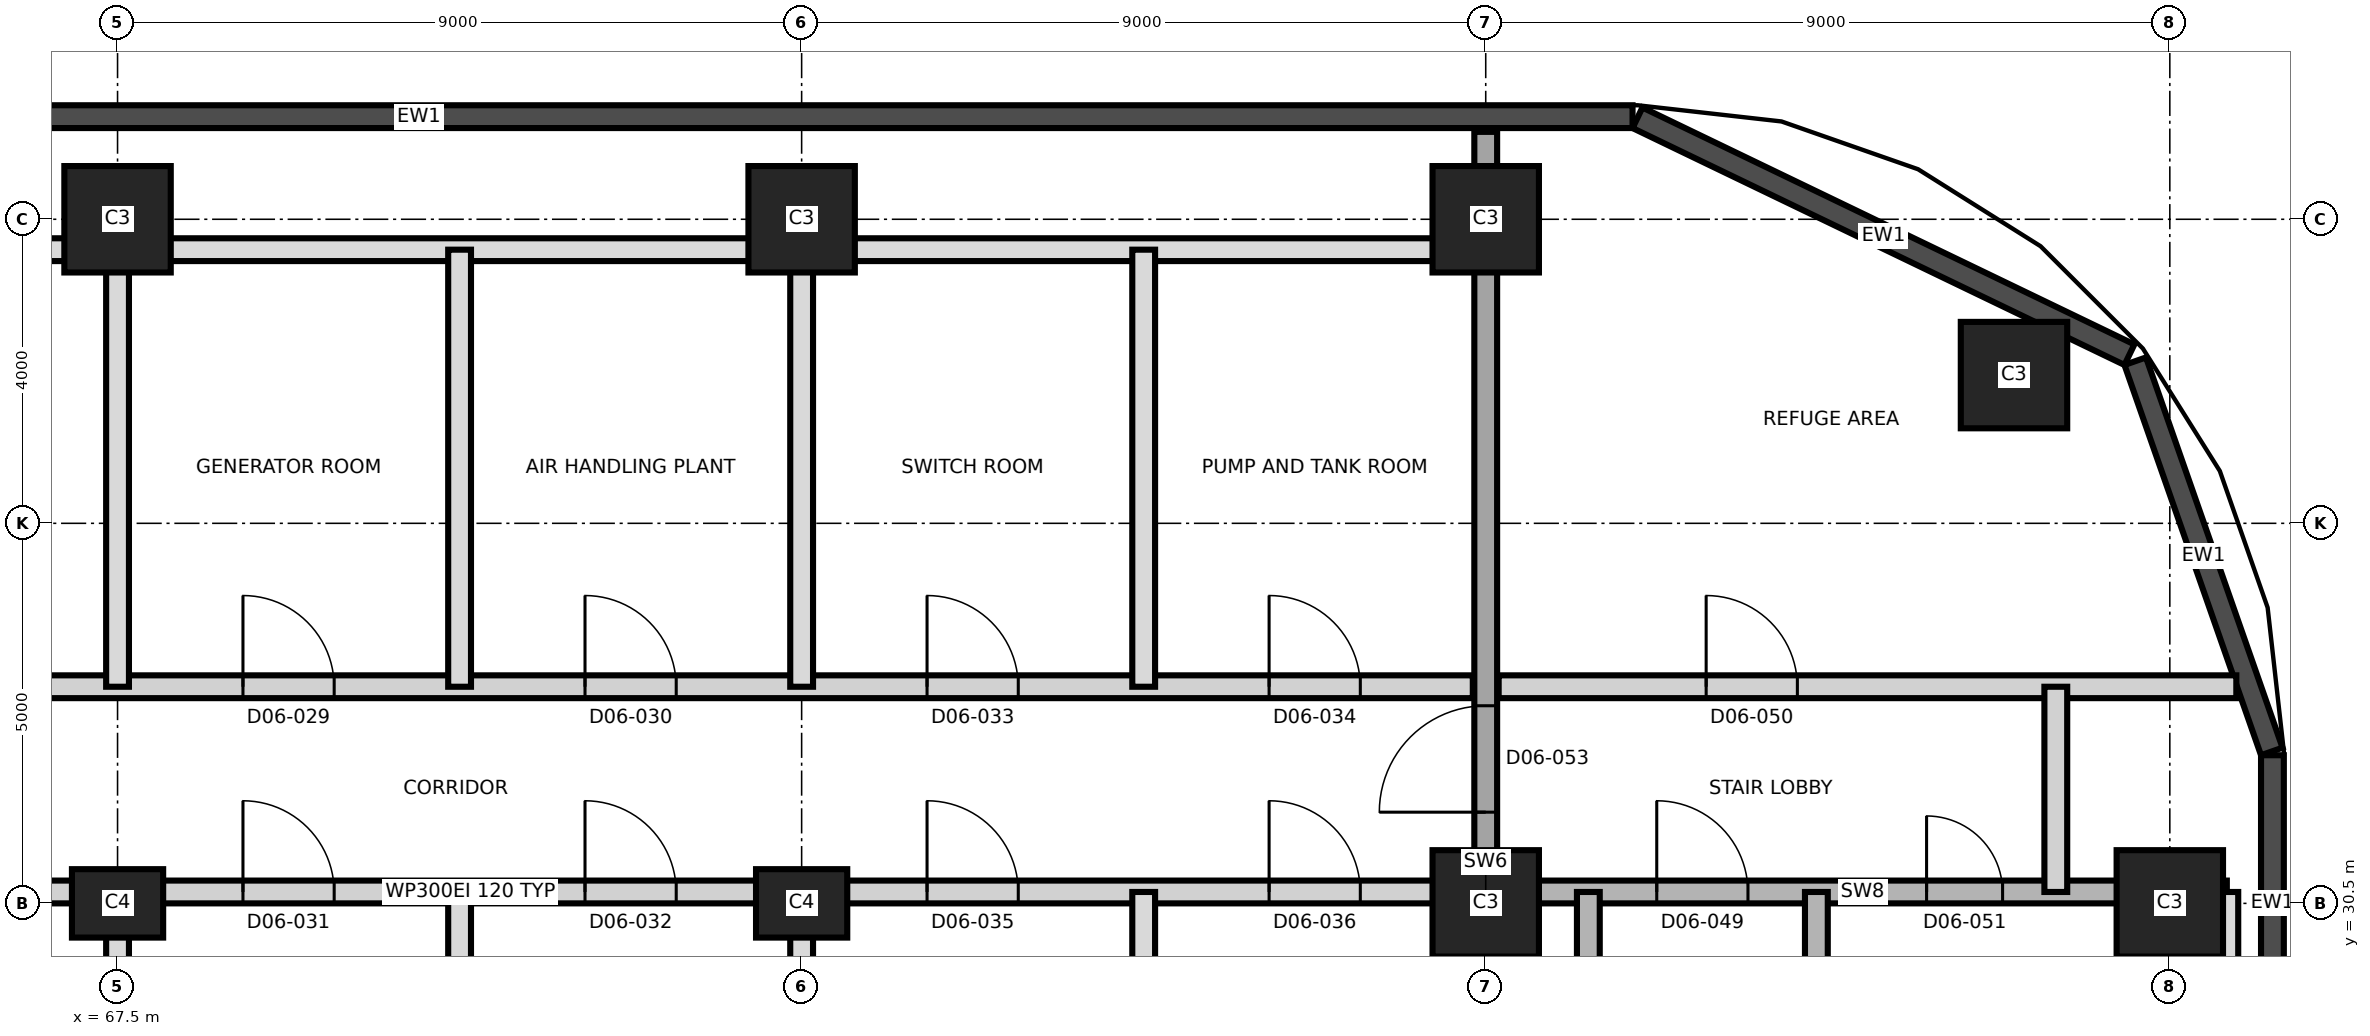
"""IFC4 building model, lengths in metres.
Left out: names, types, materials, properties, quantities, classifications, styles, units other than length and angle.
Written with IfcOpenShell. Run it as: python <this file> out.ifc"""

import sys

from ifc_helpers import new_model, si_unit, direction, frame, frame_2d, origin, origin_2d, place, context, subcontext, project, spatial, rectangle, extrude, element, fill, save


model = new_model("IFC4")
c1 = context("Model", 3, precision=1e-05, world=origin(), true_north=direction((0.0, 1.0)))
c2 = subcontext(c1, "Body", "Model", "MODEL_VIEW")
j1 = project(units=[si_unit("LENGTHUNIT", "METRE"), si_unit("PLANEANGLEUNIT", "RADIAN")], contexts=[c1])
p1 = place(None, origin())
s1 = spatial("IfcSite", under=j1, at=p1, CompositionType="ELEMENT")
p2 = place(p1, origin())
s2 = spatial("IfcBuilding", under=s1, at=p2, CompositionType="ELEMENT")
p3 = place(p2, frame((0.0, 0.0, 81.6)))
s3 = spatial("IfcBuildingStorey", under=s2, at=p3, CompositionType="ELEMENT", Elevation=81.6)
for number, where, z_axis, x_axis in (
    (1, (67.5, 30.5, 0.0), (0.0, 0.0, 1.0), (1.0, 0.0, 0.0)),
    (2, (76.5, 30.5, 0.0), (0.0, 0.0, 1.0), (1.0, 0.0, 0.0)),
):
    element("IfcColumn", number, at=place(p3, frame(where, z_axis=z_axis, x_axis=x_axis)), inside=s3, PredefinedType="COLUMN", context=c2, shape_type="SweptSolid", body=[
        extrude(rectangle(XDim=1.2, YDim=0.9, at=origin_2d()), origin(), (0.0, 0.0, 1.0), 5.5),
    ])
for number, where, z_axis, x_axis in (
    (3, (85.5, 30.5, 0.0), (0.0, 0.0, 1.0), (1.0, 0.0, 0.0)),
    (4, (94.5, 30.5, 0.0), (0.0, 0.0, 1.0), (1.0, 0.0, 0.0)),
    (5, (92.45, 37.45, 0.0), (0.0, 0.0, 1.0), (1.0, 0.0, 0.0)),
    (6, (67.5, 39.5, 0.0), (0.0, 0.0, 1.0), (1.0, 0.0, 0.0)),
    (7, (76.5, 39.5, 0.0), (0.0, 0.0, 1.0), (1.0, 0.0, 0.0)),
    (8, (85.5, 39.5, 0.0), (0.0, 0.0, 1.0), (1.0, 0.0, 0.0)),
):
    element("IfcColumn", number, at=place(p3, frame(where, z_axis=z_axis, x_axis=x_axis)), inside=s3, PredefinedType="COLUMN", context=c2, shape_type="SweptSolid", body=[
        extrude(rectangle(XDim=1.4, YDim=1.4, at=origin_2d()), origin(), (0.0, 0.0, 1.0), 5.5),
    ])
p4 = place(p3, frame((85.5, 20.35, 0.0), z_axis=(0.0, 0.0, 1.0), x_axis=(0.0, 1.0, 0.0)))
e9 = element("IfcWall", 9, at=p4, inside=s3, PredefinedType="SHEAR", context=c2, shape_type="SweptSolid", body=[
    extrude(rectangle(XDim=20.3, YDim=0.3, at=frame_2d((10.15, 0.0))), origin(), (0.0, 0.0, 1.0), 5.5),
])
p5 = place(p4, frame((11.35, 0.0, 0.0)))
e10 = element("IfcOpeningElement", 10, at=p5, cuts=e9, PredefinedType="OPENING", context=c2, shape_type="SweptSolid", body=[
    extrude(rectangle(XDim=1.4, YDim=2.1, at=frame_2d((0.7, 1.05))), frame((0.0, 0.16, 0.0), z_axis=(0.0, -1.0, 0.0), x_axis=(1.0, 0.0, 0.0)), (0.0, 0.0, 1.0), 0.32),
])
p6 = place(p3, frame((95.85, 28.568, 0.0), z_axis=(0.0, 0.0, 1.0), x_axis=(0.0, 1.0, 0.0)))
e11 = element("IfcWall", 11, at=p6, inside=s3, PredefinedType="SOLIDWALL", context=c2, shape_type="SweptSolid", body=[
    extrude(rectangle(XDim=3.881, YDim=0.3, at=frame_2d((1.94, 0.0))), origin(), (0.0, 0.0, 1.0), 5.2),
])
p7 = place(p3, frame((95.842, 32.499, 0.0), z_axis=(0.0, 0.0, 1.0), x_axis=(-0.330290447423, 0.943879346284, 0.0)))
e12 = element("IfcWall", 12, at=p7, inside=s3, PredefinedType="SOLIDWALL", context=c2, shape_type="SweptSolid", body=[
    extrude(rectangle(XDim=5.439, YDim=0.3, at=frame_2d((2.72, 0.0))), origin(), (0.0, 0.0, 1.0), 5.2),
])
p8 = place(p3, frame((93.969, 37.719, 0.0), z_axis=(0.0, 0.0, 1.0), x_axis=(-0.90096968593, 0.433882040461, 0.0)))
e13 = element("IfcWall", 13, at=p8, inside=s3, PredefinedType="SOLIDWALL", context=c2, shape_type="SweptSolid", body=[
    extrude(rectangle(XDim=7.183, YDim=0.3, at=frame_2d((3.592, 0.0))), origin(), (0.0, 0.0, 1.0), 5.2),
])
p9 = place(p3, frame((87.432, 40.85, 0.0), z_axis=(0.0, 0.0, 1.0), x_axis=(-1.0, 0.0, 0.0)))
e14 = element("IfcWall", 14, at=p9, inside=s3, PredefinedType="SOLIDWALL", context=c2, shape_type="SweptSolid", body=[
    extrude(rectangle(XDim=31.932, YDim=0.3, at=frame_2d((15.966, 0.0))), origin(), (0.0, 0.0, 1.0), 5.2),
])
p10 = place(p3, frame((58.95, 30.65, 0.0), z_axis=(0.0, 0.0, 1.0), x_axis=(1.0, 0.0, 0.0)))
e15 = element("IfcWall", 15, at=p10, inside=s3, PredefinedType="PARTITIONING", context=c2, shape_type="SweptSolid", body=[
    extrude(rectangle(XDim=26.38, YDim=0.3, at=frame_2d((13.19, 0.0))), origin(), (0.0, 0.0, 1.0), 5.2),
])
p11 = place(p10, frame((1.2, 0.0, 0.0)))
e16 = element("IfcOpeningElement", 16, at=p11, cuts=e15, PredefinedType="OPENING", context=c2, shape_type="SweptSolid", body=[
    extrude(rectangle(XDim=1.2, YDim=2.1, at=frame_2d((0.6, 1.05))), frame((0.0, 0.16, 0.0), z_axis=(0.0, -1.0, 0.0), x_axis=(1.0, 0.0, 0.0)), (0.0, 0.0, 1.0), 0.32),
])
p12 = place(p10, frame((5.7, 0.0, 0.0)))
e17 = element("IfcOpeningElement", 17, at=p12, cuts=e15, PredefinedType="OPENING", context=c2, shape_type="SweptSolid", body=[
    extrude(rectangle(XDim=1.2, YDim=2.1, at=frame_2d((0.6, 1.05))), frame((0.0, 0.16, 0.0), z_axis=(0.0, -1.0, 0.0), x_axis=(1.0, 0.0, 0.0)), (0.0, 0.0, 1.0), 0.32),
])
p13 = place(p10, frame((10.2, 0.0, 0.0)))
e18 = element("IfcOpeningElement", 18, at=p13, cuts=e15, PredefinedType="OPENING", context=c2, shape_type="SweptSolid", body=[
    extrude(rectangle(XDim=1.2, YDim=2.1, at=frame_2d((0.6, 1.05))), frame((0.0, 0.16, 0.0), z_axis=(0.0, -1.0, 0.0), x_axis=(1.0, 0.0, 0.0)), (0.0, 0.0, 1.0), 0.32),
])
p14 = place(p10, frame((14.7, 0.0, 0.0)))
e19 = element("IfcOpeningElement", 19, at=p14, cuts=e15, PredefinedType="OPENING", context=c2, shape_type="SweptSolid", body=[
    extrude(rectangle(XDim=1.2, YDim=2.1, at=frame_2d((0.6, 1.05))), frame((0.0, 0.16, 0.0), z_axis=(0.0, -1.0, 0.0), x_axis=(1.0, 0.0, 0.0)), (0.0, 0.0, 1.0), 0.32),
])
p15 = place(p10, frame((19.2, 0.0, 0.0)))
e20 = element("IfcOpeningElement", 20, at=p15, cuts=e15, PredefinedType="OPENING", context=c2, shape_type="SweptSolid", body=[
    extrude(rectangle(XDim=1.2, YDim=2.1, at=frame_2d((0.6, 1.05))), frame((0.0, 0.16, 0.0), z_axis=(0.0, -1.0, 0.0), x_axis=(1.0, 0.0, 0.0)), (0.0, 0.0, 1.0), 0.32),
])
p16 = place(p10, frame((23.7, 0.0, 0.0)))
e21 = element("IfcOpeningElement", 21, at=p16, cuts=e15, PredefinedType="OPENING", context=c2, shape_type="SweptSolid", body=[
    extrude(rectangle(XDim=1.2, YDim=2.1, at=frame_2d((0.6, 1.05))), frame((0.0, 0.16, 0.0), z_axis=(0.0, -1.0, 0.0), x_axis=(1.0, 0.0, 0.0)), (0.0, 0.0, 1.0), 0.32),
])
p17 = place(p3, frame((85.67, 30.65, 0.0), z_axis=(0.0, 0.0, 1.0), x_axis=(1.0, 0.0, 0.0)))
e22 = element("IfcWall", 22, at=p17, inside=s3, PredefinedType="SHEAR", context=c2, shape_type="SweptSolid", body=[
    extrude(rectangle(XDim=9.58, YDim=0.3, at=frame_2d((4.79, 0.0))), origin(), (0.0, 0.0, 1.0), 5.2),
])
p18 = place(p17, frame((2.08, 0.0, 0.0)))
e23 = element("IfcOpeningElement", 23, at=p18, cuts=e22, PredefinedType="OPENING", context=c2, shape_type="SweptSolid", body=[
    extrude(rectangle(XDim=1.2, YDim=2.1, at=frame_2d((0.6, 1.05))), frame((0.0, 0.16, 0.0), z_axis=(0.0, -1.0, 0.0), x_axis=(1.0, 0.0, 0.0)), (0.0, 0.0, 1.0), 0.32),
])
p19 = place(p17, frame((5.63, 0.0, 0.0)))
e24 = element("IfcOpeningElement", 24, at=p19, cuts=e22, PredefinedType="OPENING", context=c2, shape_type="SweptSolid", body=[
    extrude(rectangle(XDim=1.0, YDim=2.1, at=frame_2d((0.5, 1.05))), frame((0.0, 0.16, 0.0), z_axis=(0.0, -1.0, 0.0), x_axis=(1.0, 0.0, 0.0)), (0.0, 0.0, 1.0), 0.32),
])
p20 = place(p3, frame((58.95, 33.35, 0.0), z_axis=(0.0, 0.0, 1.0), x_axis=(1.0, 0.0, 0.0)))
e25 = element("IfcWall", 25, at=p20, inside=s3, PredefinedType="PARTITIONING", context=c2, shape_type="SweptSolid", body=[
    extrude(rectangle(XDim=26.38, YDim=0.3, at=frame_2d((13.19, 0.0))), origin(), (0.0, 0.0, 1.0), 5.2),
])
p21 = place(p20, frame((1.2, 0.0, 0.0)))
e26 = element("IfcOpeningElement", 26, at=p21, cuts=e25, PredefinedType="OPENING", context=c2, shape_type="SweptSolid", body=[
    extrude(rectangle(XDim=1.2, YDim=2.1, at=frame_2d((0.6, 1.05))), frame((0.0, 0.16, 0.0), z_axis=(0.0, -1.0, 0.0), x_axis=(1.0, 0.0, 0.0)), (0.0, 0.0, 1.0), 0.32),
])
p22 = place(p20, frame((5.7, 0.0, 0.0)))
e27 = element("IfcOpeningElement", 27, at=p22, cuts=e25, PredefinedType="OPENING", context=c2, shape_type="SweptSolid", body=[
    extrude(rectangle(XDim=1.2, YDim=2.1, at=frame_2d((0.6, 1.05))), frame((0.0, 0.16, 0.0), z_axis=(0.0, -1.0, 0.0), x_axis=(1.0, 0.0, 0.0)), (0.0, 0.0, 1.0), 0.32),
])
p23 = place(p20, frame((10.2, 0.0, 0.0)))
e28 = element("IfcOpeningElement", 28, at=p23, cuts=e25, PredefinedType="OPENING", context=c2, shape_type="SweptSolid", body=[
    extrude(rectangle(XDim=1.2, YDim=2.1, at=frame_2d((0.6, 1.05))), frame((0.0, 0.16, 0.0), z_axis=(0.0, -1.0, 0.0), x_axis=(1.0, 0.0, 0.0)), (0.0, 0.0, 1.0), 0.32),
])
p24 = place(p20, frame((14.7, 0.0, 0.0)))
e29 = element("IfcOpeningElement", 29, at=p24, cuts=e25, PredefinedType="OPENING", context=c2, shape_type="SweptSolid", body=[
    extrude(rectangle(XDim=1.2, YDim=2.1, at=frame_2d((0.6, 1.05))), frame((0.0, 0.16, 0.0), z_axis=(0.0, -1.0, 0.0), x_axis=(1.0, 0.0, 0.0)), (0.0, 0.0, 1.0), 0.32),
])
p25 = place(p20, frame((19.2, 0.0, 0.0)))
e30 = element("IfcOpeningElement", 30, at=p25, cuts=e25, PredefinedType="OPENING", context=c2, shape_type="SweptSolid", body=[
    extrude(rectangle(XDim=1.2, YDim=2.1, at=frame_2d((0.6, 1.05))), frame((0.0, 0.16, 0.0), z_axis=(0.0, -1.0, 0.0), x_axis=(1.0, 0.0, 0.0)), (0.0, 0.0, 1.0), 0.32),
])
p26 = place(p20, frame((23.7, 0.0, 0.0)))
e31 = element("IfcOpeningElement", 31, at=p26, cuts=e25, PredefinedType="OPENING", context=c2, shape_type="SweptSolid", body=[
    extrude(rectangle(XDim=1.2, YDim=2.1, at=frame_2d((0.6, 1.05))), frame((0.0, 0.16, 0.0), z_axis=(0.0, -1.0, 0.0), x_axis=(1.0, 0.0, 0.0)), (0.0, 0.0, 1.0), 0.32),
])
p27 = place(p3, frame((85.67, 33.35, 0.0), z_axis=(0.0, 0.0, 1.0), x_axis=(1.0, 0.0, 0.0)))
e32 = element("IfcWall", 32, at=p27, inside=s3, PredefinedType="PARTITIONING", context=c2, shape_type="SweptSolid", body=[
    extrude(rectangle(XDim=9.705, YDim=0.3, at=frame_2d((4.853, 0.0))), origin(), (0.0, 0.0, 1.0), 5.15),
])
p28 = place(p27, frame((2.73, 0.0, 0.0)))
e33 = element("IfcOpeningElement", 33, at=p28, cuts=e32, PredefinedType="OPENING", context=c2, shape_type="SweptSolid", body=[
    extrude(rectangle(XDim=1.2, YDim=2.1, at=frame_2d((0.6, 1.05))), frame((0.0, 0.16, 0.0), z_axis=(0.0, -1.0, 0.0), x_axis=(1.0, 0.0, 0.0)), (0.0, 0.0, 1.0), 0.32),
])
p29 = place(p3, frame((58.95, 39.1, 0.0), z_axis=(0.0, 0.0, 1.0), x_axis=(1.0, 0.0, 0.0)))
e34 = element("IfcWall", 34, at=p29, inside=s3, PredefinedType="PARTITIONING", context=c2, shape_type="SweptSolid", body=[
    extrude(rectangle(XDim=26.38, YDim=0.3, at=frame_2d((13.19, 0.0))), origin(), (0.0, 0.0, 1.0), 5.2),
])
p30 = place(p3, frame((67.5, 21.9, 0.0), z_axis=(0.0, 0.0, 1.0), x_axis=(0.0, 1.0, 0.0)))
e35 = element("IfcWall", 35, at=p30, inside=s3, PredefinedType="PARTITIONING", context=c2, shape_type="SweptSolid", body=[
    extrude(rectangle(XDim=8.75, YDim=0.3, at=frame_2d((4.375, 0.0))), origin(), (0.0, 0.0, 1.0), 5.2),
])
p31 = place(p3, frame((67.5, 33.35, 0.0), z_axis=(0.0, 0.0, 1.0), x_axis=(0.0, 1.0, 0.0)))
e36 = element("IfcWall", 36, at=p31, inside=s3, PredefinedType="PARTITIONING", context=c2, shape_type="SweptSolid", body=[
    extrude(rectangle(XDim=5.75, YDim=0.3, at=frame_2d((2.875, 0.0))), origin(), (0.0, 0.0, 1.0), 5.2),
])
p32 = place(p3, frame((72.0, 21.9, 0.0), z_axis=(0.0, 0.0, 1.0), x_axis=(0.0, 1.0, 0.0)))
e37 = element("IfcWall", 37, at=p32, inside=s3, PredefinedType="PARTITIONING", context=c2, shape_type="SweptSolid", body=[
    extrude(rectangle(XDim=8.75, YDim=0.3, at=frame_2d((4.375, 0.0))), origin(), (0.0, 0.0, 1.0), 5.2),
])
p33 = place(p3, frame((72.0, 33.35, 0.0), z_axis=(0.0, 0.0, 1.0), x_axis=(0.0, 1.0, 0.0)))
e38 = element("IfcWall", 38, at=p33, inside=s3, PredefinedType="PARTITIONING", context=c2, shape_type="SweptSolid", body=[
    extrude(rectangle(XDim=5.75, YDim=0.3, at=frame_2d((2.875, 0.0))), origin(), (0.0, 0.0, 1.0), 5.2),
])
p34 = place(p3, frame((76.5, 21.9, 0.0), z_axis=(0.0, 0.0, 1.0), x_axis=(0.0, 1.0, 0.0)))
e39 = element("IfcWall", 39, at=p34, inside=s3, PredefinedType="PARTITIONING", context=c2, shape_type="SweptSolid", body=[
    extrude(rectangle(XDim=8.75, YDim=0.3, at=frame_2d((4.375, 0.0))), origin(), (0.0, 0.0, 1.0), 5.2),
])
p35 = place(p3, frame((76.5, 33.35, 0.0), z_axis=(0.0, 0.0, 1.0), x_axis=(0.0, 1.0, 0.0)))
e40 = element("IfcWall", 40, at=p35, inside=s3, PredefinedType="PARTITIONING", context=c2, shape_type="SweptSolid", body=[
    extrude(rectangle(XDim=5.75, YDim=0.3, at=frame_2d((2.875, 0.0))), origin(), (0.0, 0.0, 1.0), 5.2),
])
p36 = place(p3, frame((81.0, 21.9, 0.0), z_axis=(0.0, 0.0, 1.0), x_axis=(0.0, 1.0, 0.0)))
e41 = element("IfcWall", 41, at=p36, inside=s3, PredefinedType="PARTITIONING", context=c2, shape_type="SweptSolid", body=[
    extrude(rectangle(XDim=8.75, YDim=0.3, at=frame_2d((4.375, 0.0))), origin(), (0.0, 0.0, 1.0), 5.2),
])
p37 = place(p3, frame((81.0, 33.35, 0.0), z_axis=(0.0, 0.0, 1.0), x_axis=(0.0, 1.0, 0.0)))
e42 = element("IfcWall", 42, at=p37, inside=s3, PredefinedType="PARTITIONING", context=c2, shape_type="SweptSolid", body=[
    extrude(rectangle(XDim=5.75, YDim=0.3, at=frame_2d((2.875, 0.0))), origin(), (0.0, 0.0, 1.0), 5.2),
])
for number, where, z_axis, x_axis in (
    (43, (86.85, 21.8, 0.0), (0.0, 0.0, 1.0), (0.0, 1.0, 0.0)),
    (44, (89.85, 21.8, 0.0), (0.0, 0.0, 1.0), (0.0, 1.0, 0.0)),
):
    element("IfcWall", number, at=place(p3, frame(where, z_axis=z_axis, x_axis=x_axis)), inside=s3, PredefinedType="SHEAR", context=c2, shape_type="SweptSolid", body=[
        extrude(rectangle(XDim=8.85, YDim=0.3, at=frame_2d((4.425, 0.0))), origin(), (0.0, 0.0, 1.0), 5.2),
    ])
p38 = place(p3, frame((93.0, 30.65, 0.0), z_axis=(0.0, 0.0, 1.0), x_axis=(0.0, 1.0, 0.0)))
e45 = element("IfcWall", 45, at=p38, inside=s3, PredefinedType="PARTITIONING", context=c2, shape_type="SweptSolid", body=[
    extrude(rectangle(XDim=2.7, YDim=0.3, at=frame_2d((1.35, 0.0))), origin(), (0.0, 0.0, 1.0), 5.2),
])
p39 = place(p3, frame((95.25, 27.824, 0.0), z_axis=(0.0, 0.0, 1.0), x_axis=(0.0, 1.0, 0.0)))
e46 = element("IfcWall", 46, at=p39, inside=s3, PredefinedType="PARTITIONING", context=c2, shape_type="SweptSolid", body=[
    extrude(rectangle(XDim=2.826, YDim=0.3, at=frame_2d((1.413, 0.0))), origin(), (0.0, 0.0, 1.0), 5.15),
])
p40 = place(p23, origin())
e47 = element("IfcDoor", 47, at=p40, inside=s3, OperationType="SINGLE_SWING_LEFT", PredefinedType="DOOR", context=c2, shape_type="SweptSolid", body=[
    extrude(rectangle(XDim=1.2, YDim=2.1, at=frame_2d((0.6, 1.05))), frame((0.0, 0.025, 0.0), z_axis=(0.0, -1.0, 0.0), x_axis=(1.0, 0.0, 0.0)), (0.0, 0.0, 1.0), 0.05),
])
fill(e28, e47)
p41 = place(p24, origin())
e48 = element("IfcDoor", 48, at=p41, inside=s3, OperationType="SINGLE_SWING_RIGHT", PredefinedType="DOOR", context=c2, shape_type="SweptSolid", body=[
    extrude(rectangle(XDim=1.2, YDim=2.1, at=frame_2d((0.6, 1.05))), frame((0.0, 0.025, 0.0), z_axis=(0.0, -1.0, 0.0), x_axis=(1.0, 0.0, 0.0)), (0.0, 0.0, 1.0), 0.05),
])
fill(e29, e48)
p42 = place(p13, origin())
e49 = element("IfcDoor", 49, at=p42, inside=s3, OperationType="SINGLE_SWING_LEFT", PredefinedType="DOOR", context=c2, shape_type="SweptSolid", body=[
    extrude(rectangle(XDim=1.2, YDim=2.1, at=frame_2d((0.6, 1.05))), frame((0.0, 0.025, 0.0), z_axis=(0.0, -1.0, 0.0), x_axis=(1.0, 0.0, 0.0)), (0.0, 0.0, 1.0), 0.05),
])
fill(e18, e49)
p43 = place(p14, origin())
e50 = element("IfcDoor", 50, at=p43, inside=s3, OperationType="SINGLE_SWING_LEFT", PredefinedType="DOOR", context=c2, shape_type="SweptSolid", body=[
    extrude(rectangle(XDim=1.2, YDim=2.1, at=frame_2d((0.6, 1.05))), frame((0.0, 0.025, 0.0), z_axis=(0.0, -1.0, 0.0), x_axis=(1.0, 0.0, 0.0)), (0.0, 0.0, 1.0), 0.05),
])
fill(e19, e50)
p44 = place(p25, origin())
e51 = element("IfcDoor", 51, at=p44, inside=s3, OperationType="SINGLE_SWING_RIGHT", PredefinedType="DOOR", context=c2, shape_type="SweptSolid", body=[
    extrude(rectangle(XDim=1.2, YDim=2.1, at=frame_2d((0.6, 1.05))), frame((0.0, 0.025, 0.0), z_axis=(0.0, -1.0, 0.0), x_axis=(1.0, 0.0, 0.0)), (0.0, 0.0, 1.0), 0.05),
])
fill(e30, e51)
p45 = place(p26, origin())
e52 = element("IfcDoor", 52, at=p45, inside=s3, OperationType="SINGLE_SWING_LEFT", PredefinedType="DOOR", context=c2, shape_type="SweptSolid", body=[
    extrude(rectangle(XDim=1.2, YDim=2.1, at=frame_2d((0.6, 1.05))), frame((0.0, 0.025, 0.0), z_axis=(0.0, -1.0, 0.0), x_axis=(1.0, 0.0, 0.0)), (0.0, 0.0, 1.0), 0.05),
])
fill(e31, e52)
p46 = place(p15, origin())
e53 = element("IfcDoor", 53, at=p46, inside=s3, OperationType="SINGLE_SWING_LEFT", PredefinedType="DOOR", context=c2, shape_type="SweptSolid", body=[
    extrude(rectangle(XDim=1.2, YDim=2.1, at=frame_2d((0.6, 1.05))), frame((0.0, 0.025, 0.0), z_axis=(0.0, -1.0, 0.0), x_axis=(1.0, 0.0, 0.0)), (0.0, 0.0, 1.0), 0.05),
])
fill(e20, e53)
p47 = place(p16, origin())
e54 = element("IfcDoor", 54, at=p47, inside=s3, OperationType="SINGLE_SWING_RIGHT", PredefinedType="DOOR", context=c2, shape_type="SweptSolid", body=[
    extrude(rectangle(XDim=1.2, YDim=2.1, at=frame_2d((0.6, 1.05))), frame((0.0, 0.025, 0.0), z_axis=(0.0, -1.0, 0.0), x_axis=(1.0, 0.0, 0.0)), (0.0, 0.0, 1.0), 0.05),
])
fill(e21, e54)
p48 = place(p18, origin())
e55 = element("IfcDoor", 55, at=p48, inside=s3, OperationType="SINGLE_SWING_LEFT", PredefinedType="DOOR", context=c2, shape_type="SweptSolid", body=[
    extrude(rectangle(XDim=1.2, YDim=2.1, at=frame_2d((0.6, 1.05))), frame((0.0, 0.025, 0.0), z_axis=(0.0, -1.0, 0.0), x_axis=(1.0, 0.0, 0.0)), (0.0, 0.0, 1.0), 0.05),
])
fill(e23, e55)
p49 = place(p28, origin())
e56 = element("IfcDoor", 56, at=p49, inside=s3, OperationType="SINGLE_SWING_LEFT", PredefinedType="DOOR", context=c2, shape_type="SweptSolid", body=[
    extrude(rectangle(XDim=1.2, YDim=2.1, at=frame_2d((0.6, 1.05))), frame((0.0, 0.025, 0.0), z_axis=(0.0, -1.0, 0.0), x_axis=(1.0, 0.0, 0.0)), (0.0, 0.0, 1.0), 0.05),
])
fill(e33, e56)
p50 = place(p19, origin())
e57 = element("IfcDoor", 57, at=p50, inside=s3, OperationType="SINGLE_SWING_LEFT", PredefinedType="DOOR", context=c2, shape_type="SweptSolid", body=[
    extrude(rectangle(XDim=1.0, YDim=2.1, at=frame_2d((0.5, 1.05))), frame((0.0, 0.025, 0.0), z_axis=(0.0, -1.0, 0.0), x_axis=(1.0, 0.0, 0.0)), (0.0, 0.0, 1.0), 0.05),
])
fill(e24, e57)
p51 = place(p5, origin())
e58 = element("IfcDoor", 58, at=p51, inside=s3, OperationType="SINGLE_SWING_RIGHT", PredefinedType="DOOR", context=c2, shape_type="SweptSolid", body=[
    extrude(rectangle(XDim=1.4, YDim=2.1, at=frame_2d((0.7, 1.05))), frame((0.0, 0.025, 0.0), z_axis=(0.0, -1.0, 0.0), x_axis=(1.0, 0.0, 0.0)), (0.0, 0.0, 1.0), 0.05),
])
fill(e10, e58)
save(model, sys.argv[1])
